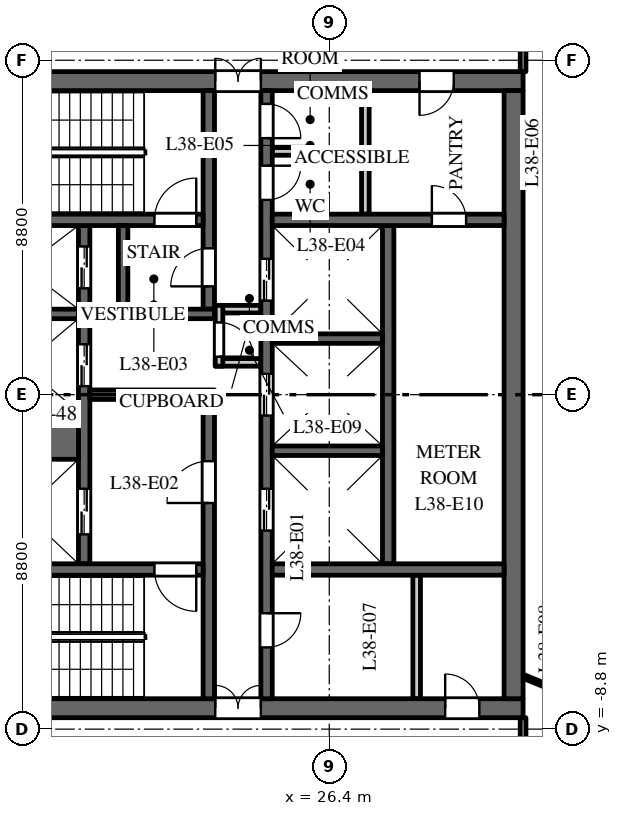
"""IFC4 building model, lengths in metres.
Left out: names, types, materials, properties, quantities, classifications, styles, units other than length and angle.
Written with IfcOpenShell. Run it as: python <this file> out.ifc"""

import sys

from ifc_helpers import new_model, si_unit, direction, frame, frame_2d, origin, place, context, subcontext, project, spatial, rectangle, extrude, element, fill, save


model = new_model("IFC4")
c1 = context("Model", 3, precision=1e-05, world=origin(), true_north=direction((0.0, 1.0)))
c2 = subcontext(c1, "Body", "Model", "MODEL_VIEW")
j1 = project(units=[si_unit("LENGTHUNIT", "METRE"), si_unit("PLANEANGLEUNIT", "RADIAN")], contexts=[c1])
p1 = place(None, origin())
s1 = spatial("IfcSite", under=j1, at=p1, CompositionType="ELEMENT")
p2 = place(p1, origin())
s2 = spatial("IfcBuilding", under=s1, at=p2, CompositionType="ELEMENT")
p3 = place(p2, frame((0.0, 0.0, 166.0)))
s3 = spatial("IfcBuildingStorey", under=s2, at=p3, CompositionType="ELEMENT", Elevation=166.0)
p4 = place(p3, frame((16.5, 8.25, 0.0), z_axis=(0.0, 0.0, 1.0), x_axis=(1.0, 0.0, 0.0)))
e1 = element("IfcWall", 1, at=p4, inside=s3, PredefinedType="SHEAR", context=c2, shape_type="SweptSolid", body=[
    extrude(rectangle(XDim=15.0, YDim=0.5, at=frame_2d((7.5, 0.0))), origin(), (0.0, 0.0, 1.0), 3.7),
])
p5 = place(p4, frame((6.9, 0.0, 0.0)))
e2 = element("IfcOpeningElement", 2, at=p5, cuts=e1, PredefinedType="OPENING", context=c2, shape_type="SweptSolid", body=[
    extrude(rectangle(XDim=1.2, YDim=2.1, at=frame_2d((0.6, 1.05))), frame((0.0, 0.26, 0.0), z_axis=(0.0, -1.0, 0.0), x_axis=(1.0, 0.0, 0.0)), (0.0, 0.0, 1.0), 0.52),
])
p6 = place(p4, frame((12.275, 0.0, 0.0)))
e3 = element("IfcOpeningElement", 3, at=p6, cuts=e1, PredefinedType="OPENING", context=c2, shape_type="SweptSolid", body=[
    extrude(rectangle(XDim=0.9, YDim=2.1, at=frame_2d((0.45, 1.05))), frame((0.0, 0.26, 0.0), z_axis=(0.0, -1.0, 0.0), x_axis=(1.0, 0.0, 0.0)), (0.0, 0.0, 1.0), 0.52),
])
p7 = place(p3, frame((16.5, -8.25, 0.0), z_axis=(0.0, 0.0, 1.0), x_axis=(1.0, 0.0, 0.0)))
e4 = element("IfcWall", 4, at=p7, inside=s3, PredefinedType="SHEAR", context=c2, shape_type="SweptSolid", body=[
    extrude(rectangle(XDim=15.0, YDim=0.5, at=frame_2d((7.5, 0.0))), origin(), (0.0, 0.0, 1.0), 3.7),
])
p8 = place(p7, frame((6.9, 0.0, 0.0)))
e5 = element("IfcOpeningElement", 5, at=p8, cuts=e4, PredefinedType="OPENING", context=c2, shape_type="SweptSolid", body=[
    extrude(rectangle(XDim=1.2, YDim=2.1, at=frame_2d((0.6, 1.05))), frame((0.0, 0.26, 0.0), z_axis=(0.0, -1.0, 0.0), x_axis=(1.0, 0.0, 0.0)), (0.0, 0.0, 1.0), 0.52),
])
p9 = place(p7, frame((12.95, 0.0, 0.0)))
e6 = element("IfcOpeningElement", 6, at=p9, cuts=e4, PredefinedType="OPENING", context=c2, shape_type="SweptSolid", body=[
    extrude(rectangle(XDim=0.9, YDim=2.1, at=frame_2d((0.45, 1.05))), frame((0.0, 0.26, 0.0), z_axis=(0.0, -1.0, 0.0), x_axis=(1.0, 0.0, 0.0)), (0.0, 0.0, 1.0), 0.52),
])
p10 = place(p3, frame((27.95, -4.45, 0.0), z_axis=(0.0, 0.0, 1.0), x_axis=(0.0, 1.0, 0.0)))
e7 = element("IfcWall", 7, at=p10, inside=s3, PredefinedType="SHEAR", context=c2, shape_type="SweptSolid", body=[
    extrude(rectangle(XDim=8.9, YDim=0.3, at=frame_2d((4.45, 0.0))), origin(), (0.0, 0.0, 1.0), 3.7),
])
p11 = place(p3, frame((19.95, -4.45, 0.0), z_axis=(0.0, 0.0, 1.0), x_axis=(0.0, 1.0, 0.0)))
e8 = element("IfcWall", 8, at=p11, inside=s3, PredefinedType="SHEAR", context=c2, shape_type="SweptSolid", body=[
    extrude(rectangle(XDim=8.9, YDim=0.3, at=frame_2d((4.45, 0.0))), origin(), (0.0, 0.0, 1.0), 3.7),
])
p12 = place(p11, frame((0.775, 0.0, 0.0)))
e9 = element("IfcOpeningElement", 9, at=p12, cuts=e8, PredefinedType="OPENING", context=c2, shape_type="SweptSolid", body=[
    extrude(rectangle(XDim=1.2, YDim=2.1, at=frame_2d((0.6, 1.05))), frame((0.0, 0.16, 0.0), z_axis=(0.0, -1.0, 0.0), x_axis=(1.0, 0.0, 0.0)), (0.0, 0.0, 1.0), 0.32),
])
p13 = place(p11, frame((4.675, 0.0, 0.0)))
e10 = element("IfcOpeningElement", 10, at=p13, cuts=e8, PredefinedType="OPENING", context=c2, shape_type="SweptSolid", body=[
    extrude(rectangle(XDim=1.1, YDim=2.1, at=frame_2d((0.55, 1.05))), frame((0.0, 0.16, 0.0), z_axis=(0.0, -1.0, 0.0), x_axis=(1.0, 0.0, 0.0)), (0.0, 0.0, 1.0), 0.32),
])
p14 = place(p11, frame((7.25, 0.0, 0.0)))
e11 = element("IfcOpeningElement", 11, at=p14, cuts=e8, PredefinedType="OPENING", context=c2, shape_type="SweptSolid", body=[
    extrude(rectangle(XDim=1.1, YDim=2.1, at=frame_2d((0.55, 1.05))), frame((0.0, 0.16, 0.0), z_axis=(0.0, -1.0, 0.0), x_axis=(1.0, 0.0, 0.0)), (0.0, 0.0, 1.0), 0.32),
])
p15 = place(p3, frame((24.75, -8.0, 0.0), z_axis=(0.0, 0.0, 1.0), x_axis=(0.0, 1.0, 0.0)))
e12 = element("IfcWall", 12, at=p15, inside=s3, PredefinedType="SHEAR", context=c2, shape_type="SweptSolid", body=[
    extrude(rectangle(XDim=16.0, YDim=0.3, at=frame_2d((8.0, 0.0))), origin(), (0.0, 0.0, 1.0), 3.7),
])
p16 = place(p15, frame((4.425, 0.0, 0.0)))
e13 = element("IfcOpeningElement", 13, at=p16, cuts=e12, PredefinedType="OPENING", context=c2, shape_type="SweptSolid", body=[
    extrude(rectangle(XDim=1.1, YDim=2.1, at=frame_2d((0.55, 1.05))), frame((0.0, 0.16, 0.0), z_axis=(0.0, -1.0, 0.0), x_axis=(1.0, 0.0, 0.0)), (0.0, 0.0, 1.0), 0.32),
])
p17 = place(p15, frame((7.45, 0.0, 0.0)))
e14 = element("IfcOpeningElement", 14, at=p17, cuts=e12, PredefinedType="OPENING", context=c2, shape_type="SweptSolid", body=[
    extrude(rectangle(XDim=1.1, YDim=2.1, at=frame_2d((0.55, 1.05))), frame((0.0, 0.16, 0.0), z_axis=(0.0, -1.0, 0.0), x_axis=(1.0, 0.0, 0.0)), (0.0, 0.0, 1.0), 0.32),
])
p18 = place(p15, frame((10.475, 0.0, 0.0)))
e15 = element("IfcOpeningElement", 15, at=p18, cuts=e12, PredefinedType="OPENING", context=c2, shape_type="SweptSolid", body=[
    extrude(rectangle(XDim=1.1, YDim=2.1, at=frame_2d((0.55, 1.05))), frame((0.0, 0.16, 0.0), z_axis=(0.0, -1.0, 0.0), x_axis=(1.0, 0.0, 0.0)), (0.0, 0.0, 1.0), 0.32),
])
p19 = place(p15, frame((13.125, 0.0, 0.0)))
e16 = element("IfcOpeningElement", 16, at=p19, cuts=e12, PredefinedType="OPENING", context=c2, shape_type="SweptSolid", body=[
    extrude(rectangle(XDim=0.9, YDim=2.1, at=frame_2d((0.45, 1.05))), frame((0.0, 0.16, 0.0), z_axis=(0.0, -1.0, 0.0), x_axis=(1.0, 0.0, 0.0)), (0.0, 0.0, 1.0), 0.32),
])
p20 = place(p15, frame((14.75, 0.0, 0.0)))
e17 = element("IfcOpeningElement", 17, at=p20, cuts=e12, PredefinedType="OPENING", context=c2, shape_type="SweptSolid", body=[
    extrude(rectangle(XDim=0.9, YDim=2.1, at=frame_2d((0.45, 1.05))), frame((0.0, 0.16, 0.0), z_axis=(0.0, -1.0, 0.0), x_axis=(1.0, 0.0, 0.0)), (0.0, 0.0, 1.0), 0.32),
])
p21 = place(p15, frame((1.35, 0.0, 0.0)))
e18 = element("IfcOpeningElement", 18, at=p21, cuts=e12, PredefinedType="OPENING", context=c2, shape_type="SweptSolid", body=[
    extrude(rectangle(XDim=0.9, YDim=2.1, at=frame_2d((0.45, 1.05))), frame((0.0, 0.16, 0.0), z_axis=(0.0, -1.0, 0.0), x_axis=(1.0, 0.0, 0.0)), (0.0, 0.0, 1.0), 0.32),
])
p22 = place(p3, frame((20.1, 0.0, 0.0), z_axis=(0.0, 0.0, 1.0), x_axis=(1.0, 0.0, 0.0)))
e19 = element("IfcWall", 19, at=p22, inside=s3, PredefinedType="SHEAR", context=c2, shape_type="SweptSolid", body=[
    extrude(rectangle(XDim=3.28, YDim=0.25, at=frame_2d((1.64, 0.0))), origin(), (0.0, 0.0, 1.0), 3.7),
])
for number, where, z_axis, x_axis in (
    (20, (23.4, 0.85, 0.0), (0.0, 0.0, 1.0), (1.0, 0.0, 0.0)),
    (21, (23.4, 2.25, 0.0), (0.0, 0.0, 1.0), (1.0, 0.0, 0.0)),
):
    element("IfcWall", number, at=place(p3, frame(where, z_axis=z_axis, x_axis=x_axis)), inside=s3, PredefinedType="PARTITIONING", context=c2, shape_type="SweptSolid", body=[
        extrude(rectangle(XDim=1.2, YDim=0.2, at=frame_2d((0.6, 0.0))), origin(), (0.0, 0.0, 1.0), 3.7),
    ])
p23 = place(p3, frame((23.5, 0.75, 0.0), z_axis=(0.0, 0.0, 1.0), x_axis=(0.0, 1.0, 0.0)))
e22 = element("IfcWall", 22, at=p23, inside=s3, PredefinedType="PARTITIONING", context=c2, shape_type="SweptSolid", body=[
    extrude(rectangle(XDim=1.6, YDim=0.2, at=frame_2d((0.8, 0.0))), origin(), (0.0, 0.0, 1.0), 3.7),
])
p24 = place(p23, frame((0.25, 0.0, 0.0)))
e23 = element("IfcOpeningElement", 23, at=p24, cuts=e22, PredefinedType="OPENING", context=c2, shape_type="SweptSolid", body=[
    extrude(rectangle(XDim=0.9, YDim=2.1, at=frame_2d((0.45, 1.05))), frame((0.0, 0.11, 0.0), z_axis=(0.0, -1.0, 0.0), x_axis=(1.0, 0.0, 0.0)), (0.0, 0.0, 1.0), 0.22),
])
p25 = place(p3, frame((31.25, -8.0, 0.0), z_axis=(0.0, 0.0, 1.0), x_axis=(0.0, 1.0, 0.0)))
e24 = element("IfcWall", 24, at=p25, inside=s3, PredefinedType="SHEAR", context=c2, shape_type="SweptSolid", body=[
    extrude(rectangle(XDim=16.0, YDim=0.5, at=frame_2d((8.0, 0.0))), origin(), (0.0, 0.0, 1.0), 3.7),
])
p26 = place(p3, frame((24.9, 4.6, 0.0), z_axis=(0.0, 0.0, 1.0), x_axis=(1.0, 0.0, 0.0)))
e25 = element("IfcWall", 25, at=p26, inside=s3, PredefinedType="SHEAR", context=c2, shape_type="SweptSolid", body=[
    extrude(rectangle(XDim=6.1, YDim=0.3, at=frame_2d((3.05, 0.0))), origin(), (0.0, 0.0, 1.0), 3.7),
])
p27 = place(p26, frame((4.2, 0.0, 0.0)))
e26 = element("IfcOpeningElement", 26, at=p27, cuts=e25, PredefinedType="OPENING", context=c2, shape_type="SweptSolid", body=[
    extrude(rectangle(XDim=0.9, YDim=2.1, at=frame_2d((0.45, 1.05))), frame((0.0, 0.16, 0.0), z_axis=(0.0, -1.0, 0.0), x_axis=(1.0, 0.0, 0.0)), (0.0, 0.0, 1.0), 0.32),
])
for number, where, z_axis, x_axis in (
    (27, (27.35, 4.75, 0.0), (0.0, 0.0, 1.0), (0.0, 1.0, 0.0)),
    (28, (28.7, -8.0, 0.0), (0.0, 0.0, 1.0), (0.0, 1.0, 0.0)),
):
    element("IfcWall", number, at=place(p3, frame(where, z_axis=z_axis, x_axis=x_axis)), inside=s3, PredefinedType="PARTITIONING", context=c2, shape_type="SweptSolid", body=[
        extrude(rectangle(XDim=3.25, YDim=0.2, at=frame_2d((1.625, 0.0))), origin(), (0.0, 0.0, 1.0), 3.7),
    ])
p28 = place(p3, frame((24.9, 6.4, 0.0), z_axis=(0.0, 0.0, 1.0), x_axis=(1.0, 0.0, 0.0)))
e29 = element("IfcWall", 29, at=p28, inside=s3, PredefinedType="PARTITIONING", context=c2, shape_type="SweptSolid", body=[
    extrude(rectangle(XDim=2.35, YDim=0.2, at=frame_2d((1.175, 0.0))), origin(), (0.0, 0.0, 1.0), 3.7),
])
p29 = place(p3, frame((24.9, -4.6, 0.0), z_axis=(0.0, 0.0, 1.0), x_axis=(1.0, 0.0, 0.0)))
e30 = element("IfcWall", 30, at=p29, inside=s3, PredefinedType="SHEAR", context=c2, shape_type="SweptSolid", body=[
    extrude(rectangle(XDim=6.1, YDim=0.3, at=frame_2d((3.05, 0.0))), origin(), (0.0, 0.0, 1.0), 3.7),
])
p30 = place(p3, frame((16.9, -1.075, 0.0), z_axis=(0.0, 0.0, 1.0), x_axis=(1.0, 0.0, 0.0)))
e31 = element("IfcWall", 31, at=p30, inside=s3, PredefinedType="SHEAR", context=c2, shape_type="SweptSolid", body=[
    extrude(rectangle(XDim=2.9, YDim=1.25, at=frame_2d((1.45, 0.0))), origin(), (0.0, 0.0, 1.0), 3.7),
])
for number, where, z_axis, x_axis in (
    (32, (16.9, 2.125, 0.0), (0.0, 0.0, 1.0), (1.0, 0.0, 0.0)),
    (33, (24.9, -1.475, 0.0), (0.0, 0.0, 1.0), (1.0, 0.0, 0.0)),
    (34, (24.9, 1.475, 0.0), (0.0, 0.0, 1.0), (1.0, 0.0, 0.0)),
):
    element("IfcWall", number, at=place(p3, frame(where, z_axis=z_axis, x_axis=x_axis)), inside=s3, PredefinedType="SHEAR", context=c2, shape_type="SweptSolid", body=[
        extrude(rectangle(XDim=2.9, YDim=0.25, at=frame_2d((1.45, 0.0))), origin(), (0.0, 0.0, 1.0), 3.7),
    ])
p31 = place(p3, frame((23.23, 2.25, 0.0), z_axis=(0.0, 0.0, 1.0), x_axis=(0.0, 1.0, 0.0)))
e35 = element("IfcWall", 35, at=p31, inside=s3, PredefinedType="SHEAR", context=c2, shape_type="SweptSolid", body=[
    extrude(rectangle(XDim=5.75, YDim=0.3, at=frame_2d((2.875, 0.0))), origin(), (0.0, 0.0, 1.0), 3.7),
])
p32 = place(p31, frame((0.6, 0.0, 0.0)))
e36 = element("IfcOpeningElement", 36, at=p32, cuts=e35, PredefinedType="OPENING", context=c2, shape_type="SweptSolid", body=[
    extrude(rectangle(XDim=1.0, YDim=2.1, at=frame_2d((0.5, 1.05))), frame((0.0, 0.16, 0.0), z_axis=(0.0, -1.0, 0.0), x_axis=(1.0, 0.0, 0.0)), (0.0, 0.0, 1.0), 0.32),
])
p33 = place(p3, frame((23.23, -8.0, 0.0), z_axis=(0.0, 0.0, 1.0), x_axis=(0.0, 1.0, 0.0)))
e37 = element("IfcWall", 37, at=p33, inside=s3, PredefinedType="SHEAR", context=c2, shape_type="SweptSolid", body=[
    extrude(rectangle(XDim=7.875, YDim=0.3, at=frame_2d((3.938, 0.0))), origin(), (0.0, 0.0, 1.0), 3.7),
])
p34 = place(p33, frame((5.15, 0.0, 0.0)))
e38 = element("IfcOpeningElement", 38, at=p34, cuts=e37, PredefinedType="OPENING", context=c2, shape_type="SweptSolid", body=[
    extrude(rectangle(XDim=1.1, YDim=2.1, at=frame_2d((0.55, 1.05))), frame((0.0, 0.16, 0.0), z_axis=(0.0, -1.0, 0.0), x_axis=(1.0, 0.0, 0.0)), (0.0, 0.0, 1.0), 0.32),
])
p35 = place(p3, frame((16.9, 4.6, 0.0), z_axis=(0.0, 0.0, 1.0), x_axis=(1.0, 0.0, 0.0)))
e39 = element("IfcWall", 39, at=p35, inside=s3, PredefinedType="SHEAR", context=c2, shape_type="SweptSolid", body=[
    extrude(rectangle(XDim=6.18, YDim=0.3, at=frame_2d((3.09, 0.0))), origin(), (0.0, 0.0, 1.0), 3.7),
])
p36 = place(p35, frame((4.9, 0.0, 0.0)))
e40 = element("IfcOpeningElement", 40, at=p36, cuts=e39, PredefinedType="OPENING", context=c2, shape_type="SweptSolid", body=[
    extrude(rectangle(XDim=1.1, YDim=2.1, at=frame_2d((0.55, 1.05))), frame((0.0, 0.16, 0.0), z_axis=(0.0, -1.0, 0.0), x_axis=(1.0, 0.0, 0.0)), (0.0, 0.0, 1.0), 0.32),
])
p37 = place(p3, frame((16.9, -4.6, 0.0), z_axis=(0.0, 0.0, 1.0), x_axis=(1.0, 0.0, 0.0)))
e41 = element("IfcWall", 41, at=p37, inside=s3, PredefinedType="SHEAR", context=c2, shape_type="SweptSolid", body=[
    extrude(rectangle(XDim=6.18, YDim=0.3, at=frame_2d((3.09, 0.0))), origin(), (0.0, 0.0, 1.0), 3.7),
])
p38 = place(p37, frame((4.9, 0.0, 0.0)))
e42 = element("IfcOpeningElement", 42, at=p38, cuts=e41, PredefinedType="OPENING", context=c2, shape_type="SweptSolid", body=[
    extrude(rectangle(XDim=1.1, YDim=2.1, at=frame_2d((0.55, 1.05))), frame((0.0, 0.16, 0.0), z_axis=(0.0, -1.0, 0.0), x_axis=(1.0, 0.0, 0.0)), (0.0, 0.0, 1.0), 0.32),
])
p39 = place(p3, frame((20.85, 2.125, 0.0), z_axis=(0.0, 0.0, 1.0), x_axis=(1.0, 0.0, 0.0)))
e43 = element("IfcWall", 43, at=p39, inside=s3, PredefinedType="SHEAR", context=c2, shape_type="SweptSolid", body=[
    extrude(rectangle(XDim=2.53, YDim=0.25, at=frame_2d((1.265, 0.0))), origin(), (0.0, 0.0, 1.0), 3.7),
])
p40 = place(p3, frame((20.975, 2.25, 0.0), z_axis=(0.0, 0.0, 1.0), x_axis=(0.0, 1.0, 0.0)))
e44 = element("IfcWall", 44, at=p40, inside=s3, PredefinedType="SHEAR", context=c2, shape_type="SweptSolid", body=[
    extrude(rectangle(XDim=2.2, YDim=0.25, at=frame_2d((1.1, 0.0))), origin(), (0.0, 0.0, 1.0), 3.7),
])
p41 = place(p3, frame((31.5, -10.7, 0.0), z_axis=(0.0, 0.0, 1.0), x_axis=(0.0, 1.0, 0.0)))
e45 = element("IfcWall", 45, at=p41, inside=s3, PredefinedType="PARTITIONING", context=c2, shape_type="SweptSolid", body=[
    extrude(rectangle(XDim=2.2, YDim=0.15, at=frame_2d((1.1, 0.0))), origin(), (0.0, 0.0, 1.0), 2.9),
])
p42 = place(p3, frame((31.5, -7.41, 0.0), z_axis=(0.0, 0.0, 1.0), x_axis=(0.925344112436, -0.379128307542, 0.0)))
e46 = element("IfcWall", 46, at=p42, inside=s3, PredefinedType="PARTITIONING", context=c2, shape_type="SweptSolid", body=[
    extrude(rectangle(XDim=2.954, YDim=0.1, at=frame_2d((1.477, 0.0))), origin(), (0.0, 0.0, 1.0), 3.7),
])
p43 = place(p3, frame((31.5, 8.5, 0.0), z_axis=(0.0, 0.0, 1.0), x_axis=(0.0, 1.0, 0.0)))
e47 = element("IfcWall", 47, at=p43, inside=s3, PredefinedType="PARTITIONING", context=c2, shape_type="SweptSolid", body=[
    extrude(rectangle(XDim=2.2, YDim=0.15, at=frame_2d((1.1, 0.0))), origin(), (0.0, 0.0, 1.0), 2.9),
])
p44 = place(p12, origin())
e48 = element("IfcDoor", 48, at=p44, inside=s3, OperationType="DOUBLE_DOOR_SLIDING", PredefinedType="DOOR", context=c2, shape_type="SweptSolid", body=[
    extrude(rectangle(XDim=1.2, YDim=2.1, at=frame_2d((0.6, 1.05))), frame((0.0, 0.025, 0.0), z_axis=(0.0, -1.0, 0.0), x_axis=(1.0, 0.0, 0.0)), (0.0, 0.0, 1.0), 0.05),
])
fill(e9, e48)
p45 = place(p13, origin())
e49 = element("IfcDoor", 49, at=p45, inside=s3, OperationType="DOUBLE_DOOR_SLIDING", PredefinedType="DOOR", context=c2, shape_type="SweptSolid", body=[
    extrude(rectangle(XDim=1.1, YDim=2.1, at=frame_2d((0.55, 1.05))), frame((0.0, 0.025, 0.0), z_axis=(0.0, -1.0, 0.0), x_axis=(1.0, 0.0, 0.0)), (0.0, 0.0, 1.0), 0.05),
])
fill(e10, e49)
p46 = place(p14, origin())
e50 = element("IfcDoor", 50, at=p46, inside=s3, OperationType="DOUBLE_DOOR_SLIDING", PredefinedType="DOOR", context=c2, shape_type="SweptSolid", body=[
    extrude(rectangle(XDim=1.1, YDim=2.1, at=frame_2d((0.55, 1.05))), frame((0.0, 0.025, 0.0), z_axis=(0.0, -1.0, 0.0), x_axis=(1.0, 0.0, 0.0)), (0.0, 0.0, 1.0), 0.05),
])
fill(e11, e50)
p47 = place(p16, origin())
e51 = element("IfcDoor", 51, at=p47, inside=s3, OperationType="DOUBLE_DOOR_SLIDING", PredefinedType="DOOR", context=c2, shape_type="SweptSolid", body=[
    extrude(rectangle(XDim=1.1, YDim=2.1, at=frame_2d((0.55, 1.05))), frame((0.0, 0.025, 0.0), z_axis=(0.0, -1.0, 0.0), x_axis=(1.0, 0.0, 0.0)), (0.0, 0.0, 1.0), 0.05),
])
fill(e13, e51)
p48 = place(p17, origin())
e52 = element("IfcDoor", 52, at=p48, inside=s3, OperationType="DOUBLE_DOOR_SLIDING", PredefinedType="DOOR", context=c2, shape_type="SweptSolid", body=[
    extrude(rectangle(XDim=1.1, YDim=2.1, at=frame_2d((0.55, 1.05))), frame((0.0, 0.025, 0.0), z_axis=(0.0, -1.0, 0.0), x_axis=(1.0, 0.0, 0.0)), (0.0, 0.0, 1.0), 0.05),
])
fill(e14, e52)
p49 = place(p18, origin())
e53 = element("IfcDoor", 53, at=p49, inside=s3, OperationType="DOUBLE_DOOR_SLIDING", PredefinedType="DOOR", context=c2, shape_type="SweptSolid", body=[
    extrude(rectangle(XDim=1.1, YDim=2.1, at=frame_2d((0.55, 1.05))), frame((0.0, 0.025, 0.0), z_axis=(0.0, -1.0, 0.0), x_axis=(1.0, 0.0, 0.0)), (0.0, 0.0, 1.0), 0.05),
])
fill(e15, e53)
p50 = place(p36, origin())
e54 = element("IfcDoor", 54, at=p50, inside=s3, OperationType="SINGLE_SWING_LEFT", PredefinedType="DOOR", context=c2, shape_type="SweptSolid", body=[
    extrude(rectangle(XDim=1.1, YDim=2.1, at=frame_2d((0.55, 1.05))), frame((0.0, 0.025, 0.0), z_axis=(0.0, -1.0, 0.0), x_axis=(1.0, 0.0, 0.0)), (0.0, 0.0, 1.0), 0.05),
])
fill(e40, e54)
p51 = place(p38, origin())
e55 = element("IfcDoor", 55, at=p51, inside=s3, OperationType="SINGLE_SWING_RIGHT", PredefinedType="DOOR", context=c2, shape_type="SweptSolid", body=[
    extrude(rectangle(XDim=1.1, YDim=2.1, at=frame_2d((0.55, 1.05))), frame((0.0, 0.025, 0.0), z_axis=(0.0, -1.0, 0.0), x_axis=(1.0, 0.0, 0.0)), (0.0, 0.0, 1.0), 0.05),
])
fill(e42, e55)
p52 = place(p34, origin())
e56 = element("IfcDoor", 56, at=p52, inside=s3, OperationType="SINGLE_SWING_RIGHT", PredefinedType="DOOR", context=c2, shape_type="SweptSolid", body=[
    extrude(rectangle(XDim=1.1, YDim=2.1, at=frame_2d((0.55, 1.05))), frame((0.0, 0.025, 0.0), z_axis=(0.0, -1.0, 0.0), x_axis=(1.0, 0.0, 0.0)), (0.0, 0.0, 1.0), 0.05),
])
fill(e38, e56)
p53 = place(p32, origin())
e57 = element("IfcDoor", 57, at=p53, inside=s3, OperationType="SINGLE_SWING_RIGHT", PredefinedType="DOOR", context=c2, shape_type="SweptSolid", body=[
    extrude(rectangle(XDim=1.0, YDim=2.1, at=frame_2d((0.5, 1.05))), frame((0.0, 0.025, 0.0), z_axis=(0.0, -1.0, 0.0), x_axis=(1.0, 0.0, 0.0)), (0.0, 0.0, 1.0), 0.05),
])
fill(e36, e57)
p54 = place(p5, origin())
e58 = element("IfcDoor", 58, at=p54, inside=s3, OperationType="DOUBLE_DOOR_DOUBLE_SWING", PredefinedType="DOOR", context=c2, shape_type="SweptSolid", body=[
    extrude(rectangle(XDim=1.2, YDim=2.1, at=frame_2d((0.6, 1.05))), frame((0.0, 0.025, 0.0), z_axis=(0.0, -1.0, 0.0), x_axis=(1.0, 0.0, 0.0)), (0.0, 0.0, 1.0), 0.05),
])
fill(e2, e58)
p55 = place(p8, origin())
e59 = element("IfcDoor", 59, at=p55, inside=s3, OperationType="DOUBLE_DOOR_DOUBLE_SWING", PredefinedType="DOOR", context=c2, shape_type="SweptSolid", body=[
    extrude(rectangle(XDim=1.2, YDim=2.1, at=frame_2d((0.6, 1.05))), frame((0.0, 0.025, 0.0), z_axis=(0.0, -1.0, 0.0), x_axis=(1.0, 0.0, 0.0)), (0.0, 0.0, 1.0), 0.05),
])
fill(e5, e59)
p56 = place(p19, origin())
e60 = element("IfcDoor", 60, at=p56, inside=s3, OperationType="SINGLE_SWING_RIGHT", PredefinedType="DOOR", context=c2, shape_type="SweptSolid", body=[
    extrude(rectangle(XDim=0.9, YDim=2.1, at=frame_2d((0.45, 1.05))), frame((0.0, 0.025, 0.0), z_axis=(0.0, -1.0, 0.0), x_axis=(1.0, 0.0, 0.0)), (0.0, 0.0, 1.0), 0.05),
])
fill(e16, e60)
p57 = place(p20, origin())
e61 = element("IfcDoor", 61, at=p57, inside=s3, OperationType="SINGLE_SWING_LEFT", PredefinedType="DOOR", context=c2, shape_type="SweptSolid", body=[
    extrude(rectangle(XDim=0.9, YDim=2.1, at=frame_2d((0.45, 1.05))), frame((0.0, 0.025, 0.0), z_axis=(0.0, -1.0, 0.0), x_axis=(1.0, 0.0, 0.0)), (0.0, 0.0, 1.0), 0.05),
])
fill(e17, e61)
p58 = place(p6, origin())
e62 = element("IfcDoor", 62, at=p58, inside=s3, OperationType="SINGLE_SWING_LEFT", PredefinedType="DOOR", context=c2, shape_type="SweptSolid", body=[
    extrude(rectangle(XDim=0.9, YDim=2.1, at=frame_2d((0.45, 1.05))), frame((0.0, 0.025, 0.0), z_axis=(0.0, -1.0, 0.0), x_axis=(1.0, 0.0, 0.0)), (0.0, 0.0, 1.0), 0.05),
])
fill(e3, e62)
p59 = place(p21, origin())
e63 = element("IfcDoor", 63, at=p59, inside=s3, OperationType="SINGLE_SWING_RIGHT", PredefinedType="DOOR", context=c2, shape_type="SweptSolid", body=[
    extrude(rectangle(XDim=0.9, YDim=2.1, at=frame_2d((0.45, 1.05))), frame((0.0, 0.025, 0.0), z_axis=(0.0, -1.0, 0.0), x_axis=(1.0, 0.0, 0.0)), (0.0, 0.0, 1.0), 0.05),
])
fill(e18, e63)
p60 = place(p9, origin())
e64 = element("IfcDoor", 64, at=p60, inside=s3, OperationType="SINGLE_SWING_RIGHT", PredefinedType="DOOR", context=c2, shape_type="SweptSolid", body=[
    extrude(rectangle(XDim=0.9, YDim=2.1, at=frame_2d((0.45, 1.05))), frame((0.0, 0.025, 0.0), z_axis=(0.0, -1.0, 0.0), x_axis=(1.0, 0.0, 0.0)), (0.0, 0.0, 1.0), 0.05),
])
fill(e6, e64)
p61 = place(p24, origin())
e65 = element("IfcDoor", 65, at=p61, inside=s3, OperationType="SINGLE_SWING_LEFT", PredefinedType="DOOR", context=c2, shape_type="SweptSolid", body=[
    extrude(rectangle(XDim=0.9, YDim=2.1, at=frame_2d((0.45, 1.05))), frame((0.0, 0.025, 0.0), z_axis=(0.0, -1.0, 0.0), x_axis=(1.0, 0.0, 0.0)), (0.0, 0.0, 1.0), 0.05),
])
fill(e23, e65)
p62 = place(p27, origin())
e66 = element("IfcDoor", 66, at=p62, inside=s3, OperationType="SINGLE_SWING_RIGHT", PredefinedType="DOOR", context=c2, shape_type="SweptSolid", body=[
    extrude(rectangle(XDim=0.9, YDim=2.1, at=frame_2d((0.45, 1.05))), frame((0.0, 0.025, 0.0), z_axis=(0.0, -1.0, 0.0), x_axis=(1.0, 0.0, 0.0)), (0.0, 0.0, 1.0), 0.05),
])
fill(e26, e66)
save(model, sys.argv[1])
